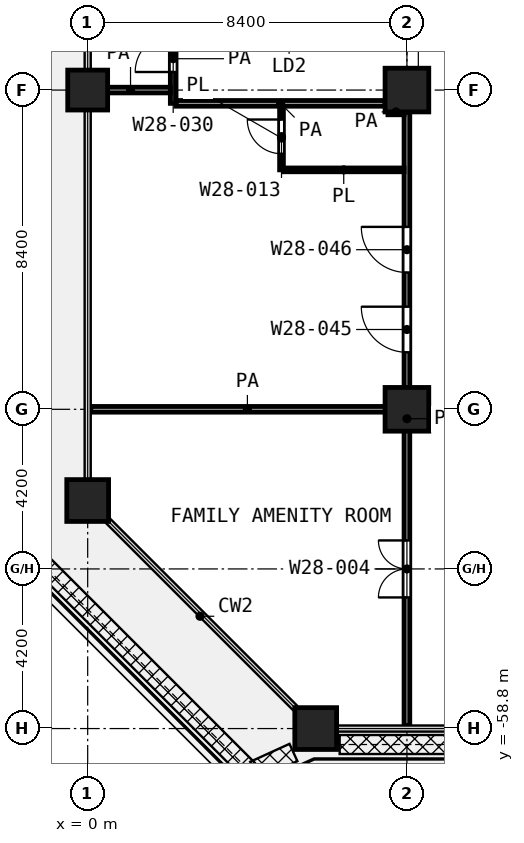
"""IFC4 building model, lengths in metres.
Left out: names, types, materials, properties, quantities, classifications, styles, units other than length and angle.
Written with IfcOpenShell. Run it as: python <this file> out.ifc"""

import sys

from ifc_helpers import new_model, si_unit, direction, frame, frame_2d, origin, origin_2d, place, context, subcontext, project, spatial, rectangle, extrude, element, fill, save


model = new_model("IFC4")
c1 = context("Model", 3, precision=1e-05, world=origin(), true_north=direction((0.0, 1.0)))
c2 = subcontext(c1, "Body", "Model", "MODEL_VIEW")
j1 = project(units=[si_unit("LENGTHUNIT", "METRE"), si_unit("PLANEANGLEUNIT", "RADIAN")], contexts=[c1])
p1 = place(None, origin())
s1 = spatial("IfcSite", under=j1, at=p1, CompositionType="ELEMENT")
p2 = place(p1, origin())
s2 = spatial("IfcBuilding", under=s1, at=p2, CompositionType="ELEMENT")
p3 = place(p2, frame((0.0, 0.0, 124.0)))
s3 = spatial("IfcBuildingStorey", under=s2, at=p3, CompositionType="ELEMENT", Elevation=124.0)
p4 = place(p3, frame((0.0, -42.0, 0.0), z_axis=(0.0, 0.0, 1.0), x_axis=(1.0, 0.0, 0.0)))
e1 = element("IfcColumn", 1, at=p4, inside=s3, PredefinedType="COLUMN", context=c2, shape_type="SweptSolid", body=[
    extrude(rectangle(XDim=1.05, YDim=1.05, at=origin_2d()), origin(), (0.0, 0.0, 1.0), 4.2),
])
for number, where, z_axis, x_axis in (
    (2, (8.4, -42.0, 0.0), (0.0, 0.0, 1.0), (1.0, 0.0, 0.0)),
    (3, (8.4, -50.4, 0.0), (0.0, 0.0, 1.0), (1.0, 0.0, 0.0)),
):
    element("IfcColumn", number, at=place(p3, frame(where, z_axis=z_axis, x_axis=x_axis)), inside=s3, PredefinedType="COLUMN", context=c2, shape_type="SweptSolid", body=[
        extrude(rectangle(XDim=1.15, YDim=1.15, at=origin_2d()), origin(), (0.0, 0.0, 1.0), 4.2),
    ])
for number, where, z_axis, x_axis in (
    (4, (0.0, -52.8, 0.0), (0.0, 0.0, 1.0), (1.0, 0.0, 0.0)),
    (5, (6.0, -58.8, 0.0), (0.0, 0.0, 1.0), (1.0, 0.0, 0.0)),
):
    element("IfcColumn", number, at=place(p3, frame(where, z_axis=z_axis, x_axis=x_axis)), inside=s3, PredefinedType="COLUMN", context=c2, shape_type="SweptSolid", body=[
        extrude(rectangle(XDim=1.1, YDim=1.1, at=origin_2d()), origin(), (0.0, 0.0, 1.0), 4.2),
    ])
p5 = place(p3, frame((5.15, -44.1, 0.0), z_axis=(0.0, 0.0, 1.0), x_axis=(1.0, 0.0, 0.0)))
e6 = element("IfcWall", 6, at=p5, inside=s3, PredefinedType="PARTITIONING", context=c2, shape_type="SweptSolid", body=[
    extrude(rectangle(XDim=3.175, YDim=0.1, at=frame_2d((1.587, 0.0))), origin(), (0.0, 0.0, 1.0), 3.6),
])
p6 = place(p3, frame((5.1, -44.1, 0.0), z_axis=(0.0, 0.0, 1.0), x_axis=(0.0, 1.0, 0.0)))
e7 = element("IfcWall", 7, at=p6, inside=s3, PredefinedType="PARTITIONING", context=c2, shape_type="SweptSolid", body=[
    extrude(rectangle(XDim=1.675, YDim=0.1, at=frame_2d((0.837, 0.0))), origin(), (0.0, 0.0, 1.0), 3.6),
])
p7 = place(p6, frame((0.425, 0.0, 0.0)))
e8 = element("IfcOpeningElement", 8, at=p7, cuts=e7, PredefinedType="OPENING", context=c2, shape_type="SweptSolid", body=[
    extrude(rectangle(XDim=0.9, YDim=2.1, at=frame_2d((0.45, 1.05))), frame((0.0, 0.06, 0.0), z_axis=(0.0, -1.0, 0.0), x_axis=(1.0, 0.0, 0.0)), (0.0, 0.0, 1.0), 0.12),
])
p8 = place(p3, frame((0.08, -50.4, 0.0), z_axis=(0.0, 0.0, 1.0), x_axis=(1.0, 0.0, 0.0)))
e9 = element("IfcWall", 9, at=p8, inside=s3, PredefinedType="PARTITIONING", context=c2, shape_type="SweptSolid", body=[
    extrude(rectangle(XDim=8.245, YDim=0.15, at=frame_2d((4.123, 0.0))), origin(), (0.0, 0.0, 1.0), 3.6),
])
p9 = place(p3, frame((7.9, -42.575, 0.0), z_axis=(0.0, 0.0, 1.0), x_axis=(1.0, 0.0, 0.0)))
e10 = element("IfcWall", 10, at=p9, inside=s3, PredefinedType="PARTITIONING", context=c2, shape_type="SweptSolid", body=[
    extrude(rectangle(XDim=0.425, YDim=0.15, at=frame_2d((0.212, 0.0))), origin(), (0.0, 0.0, 1.0), 3.6),
])
p10 = place(p3, frame((2.325, -42.35, 0.0), z_axis=(0.0, 0.0, 1.0), x_axis=(1.0, 0.0, 0.0)))
e11 = element("IfcWall", 11, at=p10, inside=s3, PredefinedType="PARTITIONING", context=c2, shape_type="SweptSolid", body=[
    extrude(rectangle(XDim=5.498, YDim=0.15, at=frame_2d((2.749, 0.0))), origin(), (0.0, 0.0, 1.0), 3.6),
])
p11 = place(p3, frame((0.08, -42.0, 0.0), z_axis=(0.0, 0.0, 1.0), x_axis=(1.0, 0.0, 0.0)))
e12 = element("IfcWall", 12, at=p11, inside=s3, PredefinedType="PARTITIONING", context=c2, shape_type="SweptSolid", body=[
    extrude(rectangle(XDim=2.095, YDim=0.15, at=frame_2d((1.047, 0.0))), origin(), (0.0, 0.0, 1.0), 3.6),
])
p12 = place(p3, frame((2.25, -42.35, 0.0), z_axis=(0.0, 0.0, 1.0), x_axis=(0.0, 1.0, 0.0)))
e13 = element("IfcWall", 13, at=p12, inside=s3, PredefinedType="PARTITIONING", context=c2, shape_type="SweptSolid", body=[
    extrude(rectangle(XDim=2.35, YDim=0.15, at=frame_2d((1.175, 0.0))), origin(), (0.0, 0.0, 1.0), 3.6),
])
p13 = place(p12, frame((0.825, 0.0, 0.0)))
e14 = element("IfcOpeningElement", 14, at=p13, cuts=e13, PredefinedType="OPENING", context=c2, shape_type="SweptSolid", body=[
    extrude(rectangle(XDim=1.0, YDim=2.1, at=frame_2d((0.5, 1.05))), frame((0.0, 0.085, 0.0), z_axis=(0.0, -1.0, 0.0), x_axis=(1.0, 0.0, 0.0)), (0.0, 0.0, 1.0), 0.17),
])
p14 = place(p3, frame((8.4, -58.72, 0.0), z_axis=(0.0, 0.0, 1.0), x_axis=(0.0, 1.0, 0.0)))
e15 = element("IfcWall", 15, at=p14, inside=s3, PredefinedType="PARTITIONING", context=c2, shape_type="SweptSolid", body=[
    extrude(rectangle(XDim=16.145, YDim=0.15, at=frame_2d((8.073, 0.0))), origin(), (0.0, 0.0, 1.0), 2.7),
])
p15 = place(p14, frame((9.82, 0.0, 0.0)))
e16 = element("IfcOpeningElement", 16, at=p15, cuts=e15, PredefinedType="OPENING", context=c2, shape_type="SweptSolid", body=[
    extrude(rectangle(XDim=1.2, YDim=2.1, at=frame_2d((0.6, 1.05))), frame((0.0, 0.085, 0.0), z_axis=(0.0, -1.0, 0.0), x_axis=(1.0, 0.0, 0.0)), (0.0, 0.0, 1.0), 0.17),
])
p16 = place(p14, frame((11.92, 0.0, 0.0)))
e17 = element("IfcOpeningElement", 17, at=p16, cuts=e15, PredefinedType="OPENING", context=c2, shape_type="SweptSolid", body=[
    extrude(rectangle(XDim=1.2, YDim=2.1, at=frame_2d((0.6, 1.05))), frame((0.0, 0.085, 0.0), z_axis=(0.0, -1.0, 0.0), x_axis=(1.0, 0.0, 0.0)), (0.0, 0.0, 1.0), 0.17),
])
p17 = place(p14, frame((3.37, 0.0, 0.0)))
e18 = element("IfcOpeningElement", 18, at=p17, cuts=e15, PredefinedType="OPENING", context=c2, shape_type="SweptSolid", body=[
    extrude(rectangle(XDim=1.5, YDim=2.1, at=frame_2d((0.75, 1.05))), frame((0.0, 0.085, 0.0), z_axis=(0.0, -1.0, 0.0), x_axis=(1.0, 0.0, 0.0)), (0.0, 0.0, 1.0), 0.17),
])
p18 = place(p13, origin())
e19 = element("IfcDoor", 19, at=p18, inside=s3, OperationType="SINGLE_SWING_LEFT", PredefinedType="DOOR", context=c2, shape_type="SweptSolid", body=[
    extrude(rectangle(XDim=1.0, YDim=2.1, at=frame_2d((0.5, 1.05))), frame((0.0, 0.025, 0.0), z_axis=(0.0, -1.0, 0.0), x_axis=(1.0, 0.0, 0.0)), (0.0, 0.0, 1.0), 0.05),
])
fill(e14, e19)
p19 = place(p15, origin())
e20 = element("IfcDoor", 20, at=p19, inside=s3, OperationType="SINGLE_SWING_RIGHT", PredefinedType="DOOR", context=c2, shape_type="SweptSolid", body=[
    extrude(rectangle(XDim=1.2, YDim=2.1, at=frame_2d((0.6, 1.05))), frame((0.0, 0.025, 0.0), z_axis=(0.0, -1.0, 0.0), x_axis=(1.0, 0.0, 0.0)), (0.0, 0.0, 1.0), 0.05),
])
fill(e16, e20)
p20 = place(p16, origin())
e21 = element("IfcDoor", 21, at=p20, inside=s3, OperationType="SINGLE_SWING_RIGHT", PredefinedType="DOOR", context=c2, shape_type="SweptSolid", body=[
    extrude(rectangle(XDim=1.2, YDim=2.1, at=frame_2d((0.6, 1.05))), frame((0.0, 0.025, 0.0), z_axis=(0.0, -1.0, 0.0), x_axis=(1.0, 0.0, 0.0)), (0.0, 0.0, 1.0), 0.05),
])
fill(e17, e21)
p21 = place(p7, origin())
e22 = element("IfcDoor", 22, at=p21, inside=s3, OperationType="SINGLE_SWING_RIGHT", PredefinedType="DOOR", context=c2, shape_type="SweptSolid", body=[
    extrude(rectangle(XDim=0.9, YDim=2.1, at=frame_2d((0.45, 1.05))), frame((0.0, 0.025, 0.0), z_axis=(0.0, -1.0, 0.0), x_axis=(1.0, 0.0, 0.0)), (0.0, 0.0, 1.0), 0.05),
])
fill(e8, e22)
p22 = place(p17, origin())
e23 = element("IfcDoor", 23, at=p22, inside=s3, OperationType="DOUBLE_DOOR_SINGLE_SWING", PredefinedType="DOOR", context=c2, shape_type="SweptSolid", body=[
    extrude(rectangle(XDim=1.5, YDim=2.1, at=frame_2d((0.75, 1.05))), frame((0.0, 0.025, 0.0), z_axis=(0.0, -1.0, 0.0), x_axis=(1.0, 0.0, 0.0)), (0.0, 0.0, 1.0), 0.05),
])
fill(e18, e23)
save(model, sys.argv[1])
